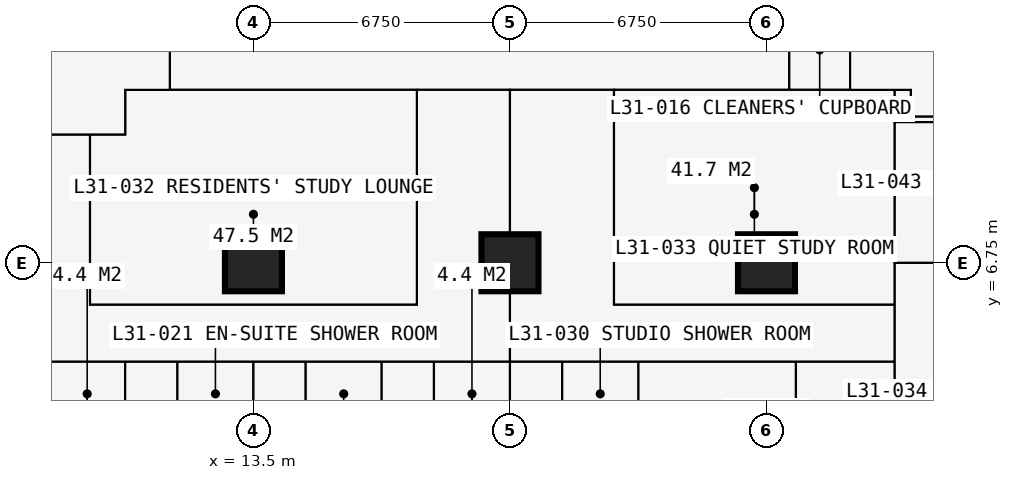
"""IFC4 building model, lengths in metres.
Left out: names, types, materials, properties, quantities, classifications, styles, units other than length and angle.
Written with IfcOpenShell. Run it as: python <this file> out.ifc"""

import sys

from ifc_helpers import new_model, si_unit, direction, frame, frame_2d, origin, origin_2d, place, context, subcontext, project, spatial, rectangle, extrude, element, fill, save


model = new_model("IFC4")
c1 = context("Model", 3, precision=1e-05, world=origin(), true_north=direction((0.0, 1.0)))
c2 = subcontext(c1, "Body", "Model", "MODEL_VIEW")
j1 = project(units=[si_unit("LENGTHUNIT", "METRE"), si_unit("PLANEANGLEUNIT", "RADIAN")], contexts=[c1])
p1 = place(None, origin())
s1 = spatial("IfcSite", under=j1, at=p1, CompositionType="ELEMENT")
p2 = place(p1, origin())
s2 = spatial("IfcBuilding", under=s1, at=p2, CompositionType="ELEMENT")
p3 = place(p2, frame((0.0, 0.0, 116.1)))
s3 = spatial("IfcBuildingStorey", under=s2, at=p3, CompositionType="ELEMENT", Elevation=116.1)
for number, where, z_axis, x_axis in (
    (1, (13.5, 6.75, 0.0), (0.0, 0.0, 1.0), (1.0, 0.0, 0.0)),
    (2, (20.25, 6.75, 0.0), (0.0, 0.0, 1.0), (1.0, 0.0, 0.0)),
    (3, (27.0, 6.75, 0.0), (0.0, 0.0, 1.0), (1.0, 0.0, 0.0)),
):
    element("IfcColumn", number, at=place(p3, frame(where, z_axis=z_axis, x_axis=x_axis)), inside=s3, PredefinedType="COLUMN", context=c2, shape_type="SweptSolid", body=[
        extrude(rectangle(XDim=1.5, YDim=1.5, at=origin_2d()), origin(), (0.0, 0.0, 1.0), 3.6),
    ])
p4 = place(p3, frame((-0.734, 10.125, 0.0), z_axis=(0.0, 0.0, 1.0), x_axis=(1.0, 0.0, 0.0)))
e4 = element("IfcWall", 4, at=p4, inside=s3, PredefinedType="PARTITIONING", context=c2, shape_type="SweptSolid", body=[
    extrude(rectangle(XDim=10.859, YDim=0.15, at=frame_2d((5.429, 0.0))), origin(), (0.0, 0.0, 1.0), 3.375),
])
p5 = place(p4, frame((5.134, 0.0, 0.0)))
e5 = element("IfcOpeningElement", 5, at=p5, cuts=e4, PredefinedType="OPENING", context=c2, shape_type="SweptSolid", body=[
    extrude(rectangle(XDim=1.0, YDim=2.2, at=frame_2d((0.5, 1.1))), frame((0.0, 0.085, 0.0), z_axis=(0.0, -1.0, 0.0), x_axis=(1.0, 0.0, 0.0)), (0.0, 0.0, 1.0), 0.17),
])
p6 = place(p3, frame((6.75, 4.15, 0.0), z_axis=(0.0, 0.0, 1.0), x_axis=(1.0, 0.0, 0.0)))
e6 = element("IfcWall", 6, at=p6, inside=s3, PredefinedType="PARTITIONING", context=c2, shape_type="SweptSolid", body=[
    extrude(rectangle(XDim=23.625, YDim=0.1, at=frame_2d((11.812, 0.0))), origin(), (0.0, 0.0, 1.0), 3.375),
])
p7 = place(p6, frame((0.2, 0.0, 0.0)))
e7 = element("IfcOpeningElement", 7, at=p7, cuts=e6, PredefinedType="OPENING", context=c2, shape_type="SweptSolid", body=[
    extrude(rectangle(XDim=0.95, YDim=2.2, at=frame_2d((0.475, 1.1))), frame((0.0, 0.06, 0.0), z_axis=(0.0, -1.0, 0.0), x_axis=(1.0, 0.0, 0.0)), (0.0, 0.0, 1.0), 0.12),
])
p8 = place(p6, frame((3.625, 0.0, 0.0)))
e8 = element("IfcOpeningElement", 8, at=p8, cuts=e6, PredefinedType="OPENING", context=c2, shape_type="SweptSolid", body=[
    extrude(rectangle(XDim=0.95, YDim=2.2, at=frame_2d((0.475, 1.1))), frame((0.0, 0.06, 0.0), z_axis=(0.0, -1.0, 0.0), x_axis=(1.0, 0.0, 0.0)), (0.0, 0.0, 1.0), 0.12),
])
p9 = place(p6, frame((7.0, 0.0, 0.0)))
e9 = element("IfcOpeningElement", 9, at=p9, cuts=e6, PredefinedType="OPENING", context=c2, shape_type="SweptSolid", body=[
    extrude(rectangle(XDim=0.95, YDim=2.2, at=frame_2d((0.475, 1.1))), frame((0.0, 0.06, 0.0), z_axis=(0.0, -1.0, 0.0), x_axis=(1.0, 0.0, 0.0)), (0.0, 0.0, 1.0), 0.12),
])
p10 = place(p6, frame((10.375, 0.0, 0.0)))
e10 = element("IfcOpeningElement", 10, at=p10, cuts=e6, PredefinedType="OPENING", context=c2, shape_type="SweptSolid", body=[
    extrude(rectangle(XDim=0.95, YDim=2.2, at=frame_2d((0.475, 1.1))), frame((0.0, 0.06, 0.0), z_axis=(0.0, -1.0, 0.0), x_axis=(1.0, 0.0, 0.0)), (0.0, 0.0, 1.0), 0.12),
])
p11 = place(p6, frame((18.475, 0.0, 0.0)))
e11 = element("IfcOpeningElement", 11, at=p11, cuts=e6, PredefinedType="OPENING", context=c2, shape_type="SweptSolid", body=[
    extrude(rectangle(XDim=0.95, YDim=2.2, at=frame_2d((0.475, 1.1))), frame((0.0, 0.06, 0.0), z_axis=(0.0, -1.0, 0.0), x_axis=(1.0, 0.0, 0.0)), (0.0, 0.0, 1.0), 0.12),
])
p12 = place(p6, frame((13.7, 0.0, 0.0)))
e12 = element("IfcOpeningElement", 12, at=p12, cuts=e6, PredefinedType="OPENING", context=c2, shape_type="SweptSolid", body=[
    extrude(rectangle(XDim=0.95, YDim=2.2, at=frame_2d((0.475, 1.1))), frame((0.0, 0.06, 0.0), z_axis=(0.0, -1.0, 0.0), x_axis=(1.0, 0.0, 0.0)), (0.0, 0.0, 1.0), 0.12),
])
p13 = place(p3, frame((9.2, 5.65, 0.0), z_axis=(0.0, 0.0, 1.0), x_axis=(0.0, 1.0, 0.0)))
e13 = element("IfcWall", 13, at=p13, inside=s3, PredefinedType="PARTITIONING", context=c2, shape_type="SweptSolid", body=[
    extrude(rectangle(XDim=4.475, YDim=0.15, at=frame_2d((2.238, 0.0))), origin(), (0.0, 0.0, 1.0), 3.375),
])
p14 = place(p3, frame((9.2, 5.65, 0.0), z_axis=(0.0, 0.0, 1.0), x_axis=(1.0, 0.0, 0.0)))
e14 = element("IfcWall", 14, at=p14, inside=s3, PredefinedType="PARTITIONING", context=c2, shape_type="SweptSolid", body=[
    extrude(rectangle(XDim=8.6, YDim=0.15, at=frame_2d((4.3, 0.0))), origin(), (0.0, 0.0, 1.0), 3.375),
])
p15 = place(p3, frame((10.125, -0.734, 0.0), z_axis=(0.0, 0.0, 1.0), x_axis=(0.0, 1.0, 0.0)))
e15 = element("IfcWall", 15, at=p15, inside=s3, PredefinedType="PARTITIONING", context=c2, shape_type="SweptSolid", body=[
    extrude(rectangle(XDim=4.884, YDim=0.175, at=frame_2d((2.442, 0.0))), origin(), (0.0, 0.0, 1.0), 3.375),
])
p16 = place(p3, frame((10.125, 10.125, 0.0), z_axis=(0.0, 0.0, 1.0), x_axis=(0.0, 1.0, 0.0)))
e16 = element("IfcWall", 16, at=p16, inside=s3, PredefinedType="PARTITIONING", context=c2, shape_type="SweptSolid", body=[
    extrude(rectangle(XDim=1.175, YDim=0.15, at=frame_2d((0.587, 0.0))), origin(), (0.0, 0.0, 1.0), 3.375),
])
p17 = place(p3, frame((10.125, 11.3, 0.0), z_axis=(0.0, 0.0, 1.0), x_axis=(1.0, 0.0, 0.0)))
e17 = element("IfcWall", 17, at=p17, inside=s3, PredefinedType="PARTITIONING", context=c2, shape_type="SweptSolid", body=[
    extrude(rectangle(XDim=20.675, YDim=0.15, at=frame_2d((10.337, 0.0))), origin(), (0.0, 0.0, 1.0), 3.375),
])
p18 = place(p17, frame((8.375, 0.0, 0.0)))
e18 = element("IfcOpeningElement", 18, at=p18, cuts=e17, PredefinedType="OPENING", context=c2, shape_type="SweptSolid", body=[
    extrude(rectangle(XDim=1.0, YDim=2.2, at=frame_2d((0.5, 1.1))), frame((0.0, 0.085, 0.0), z_axis=(0.0, -1.0, 0.0), x_axis=(1.0, 0.0, 0.0)), (0.0, 0.0, 1.0), 0.17),
])
p19 = place(p17, frame((10.975, 0.0, 0.0)))
e19 = element("IfcOpeningElement", 19, at=p19, cuts=e17, PredefinedType="OPENING", context=c2, shape_type="SweptSolid", body=[
    extrude(rectangle(XDim=1.0, YDim=2.2, at=frame_2d((0.5, 1.1))), frame((0.0, 0.085, 0.0), z_axis=(0.0, -1.0, 0.0), x_axis=(1.0, 0.0, 0.0)), (0.0, 0.0, 1.0), 0.17),
])
p20 = place(p17, frame((3.925, 0.0, 0.0)))
e20 = element("IfcOpeningElement", 20, at=p20, cuts=e17, PredefinedType="OPENING", context=c2, shape_type="SweptSolid", body=[
    extrude(rectangle(XDim=0.95, YDim=2.2, at=frame_2d((0.475, 1.1))), frame((0.0, 0.085, 0.0), z_axis=(0.0, -1.0, 0.0), x_axis=(1.0, 0.0, 0.0)), (0.0, 0.0, 1.0), 0.17),
])
p21 = place(p3, frame((11.3, 11.3, 0.0), z_axis=(0.0, 0.0, 1.0), x_axis=(0.0, 1.0, 0.0)))
e21 = element("IfcWall", 21, at=p21, inside=s3, PredefinedType="PARTITIONING", context=c2, shape_type="SweptSolid", body=[
    extrude(rectangle(XDim=19.3, YDim=0.15, at=frame_2d((9.65, 0.0))), origin(), (0.0, 0.0, 1.0), 3.375),
])
p22 = place(p21, frame((13.525, 0.0, 0.0)))
e22 = element("IfcOpeningElement", 22, at=p22, cuts=e21, PredefinedType="OPENING", context=c2, shape_type="SweptSolid", body=[
    extrude(rectangle(XDim=1.0, YDim=2.2, at=frame_2d((0.5, 1.1))), frame((0.0, 0.085, 0.0), z_axis=(0.0, -1.0, 0.0), x_axis=(1.0, 0.0, 0.0)), (0.0, 0.0, 1.0), 0.17),
])
p23 = place(p21, frame((10.438, 0.0, 0.0)))
e23 = element("IfcOpeningElement", 23, at=p23, cuts=e21, PredefinedType="OPENING", context=c2, shape_type="SweptSolid", body=[
    extrude(rectangle(XDim=1.0, YDim=2.2, at=frame_2d((0.5, 1.1))), frame((0.0, 0.085, 0.0), z_axis=(0.0, -1.0, 0.0), x_axis=(1.0, 0.0, 0.0)), (0.0, 0.0, 1.0), 0.17),
])
p24 = place(p3, frame((11.5, 1.95, 0.0), z_axis=(0.0, 0.0, 1.0), x_axis=(0.0, 1.0, 0.0)))
e24 = element("IfcWall", 24, at=p24, inside=s3, PredefinedType="PARTITIONING", context=c2, shape_type="SweptSolid", body=[
    extrude(rectangle(XDim=2.2, YDim=0.1, at=frame_2d((1.1, 0.0))), origin(), (0.0, 0.0, 1.0), 3.375),
])
p25 = place(p24, frame((0.65, 0.0, 0.0)))
e25 = element("IfcOpeningElement", 25, at=p25, cuts=e24, PredefinedType="OPENING", context=c2, shape_type="SweptSolid", body=[
    extrude(rectangle(XDim=0.9, YDim=2.2, at=frame_2d((0.45, 1.1))), frame((0.0, 0.06, 0.0), z_axis=(0.0, -1.0, 0.0), x_axis=(1.0, 0.0, 0.0)), (0.0, 0.0, 1.0), 0.12),
])
p26 = place(p3, frame((13.5, -0.734, 0.0), z_axis=(0.0, 0.0, 1.0), x_axis=(0.0, 1.0, 0.0)))
e26 = element("IfcWall", 26, at=p26, inside=s3, PredefinedType="PARTITIONING", context=c2, shape_type="SweptSolid", body=[
    extrude(rectangle(XDim=4.884, YDim=0.175, at=frame_2d((2.442, 0.0))), origin(), (0.0, 0.0, 1.0), 2.877),
])
p27 = place(p3, frame((14.875, 1.95, 0.0), z_axis=(0.0, 0.0, 1.0), x_axis=(0.0, 1.0, 0.0)))
e27 = element("IfcWall", 27, at=p27, inside=s3, PredefinedType="PARTITIONING", context=c2, shape_type="SweptSolid", body=[
    extrude(rectangle(XDim=2.2, YDim=0.1, at=frame_2d((1.1, 0.0))), origin(), (0.0, 0.0, 1.0), 3.375),
])
p28 = place(p27, frame((0.65, 0.0, 0.0)))
e28 = element("IfcOpeningElement", 28, at=p28, cuts=e27, PredefinedType="OPENING", context=c2, shape_type="SweptSolid", body=[
    extrude(rectangle(XDim=0.9, YDim=2.2, at=frame_2d((0.45, 1.1))), frame((0.0, 0.06, 0.0), z_axis=(0.0, -1.0, 0.0), x_axis=(1.0, 0.0, 0.0)), (0.0, 0.0, 1.0), 0.12),
])
p29 = place(p3, frame((16.875, -0.734, 0.0), z_axis=(0.0, 0.0, 1.0), x_axis=(0.0, 1.0, 0.0)))
e29 = element("IfcWall", 29, at=p29, inside=s3, PredefinedType="PARTITIONING", context=c2, shape_type="SweptSolid", body=[
    extrude(rectangle(XDim=4.884, YDim=0.175, at=frame_2d((2.442, 0.0))), origin(), (0.0, 0.0, 1.0), 3.375),
])
p30 = place(p3, frame((17.8, 5.65, 0.0), z_axis=(0.0, 0.0, 1.0), x_axis=(0.0, 1.0, 0.0)))
e30 = element("IfcWall", 30, at=p30, inside=s3, PredefinedType="PARTITIONING", context=c2, shape_type="SweptSolid", body=[
    extrude(rectangle(XDim=5.65, YDim=0.15, at=frame_2d((2.825, 0.0))), origin(), (0.0, 0.0, 1.0), 3.375),
])
p31 = place(p3, frame((18.25, 1.95, 0.0), z_axis=(0.0, 0.0, 1.0), x_axis=(0.0, 1.0, 0.0)))
e31 = element("IfcWall", 31, at=p31, inside=s3, PredefinedType="PARTITIONING", context=c2, shape_type="SweptSolid", body=[
    extrude(rectangle(XDim=2.2, YDim=0.1, at=frame_2d((1.1, 0.0))), origin(), (0.0, 0.0, 1.0), 3.375),
])
p32 = place(p31, frame((0.65, 0.0, 0.0)))
e32 = element("IfcOpeningElement", 32, at=p32, cuts=e31, PredefinedType="OPENING", context=c2, shape_type="SweptSolid", body=[
    extrude(rectangle(XDim=0.9, YDim=2.2, at=frame_2d((0.45, 1.1))), frame((0.0, 0.06, 0.0), z_axis=(0.0, -1.0, 0.0), x_axis=(1.0, 0.0, 0.0)), (0.0, 0.0, 1.0), 0.12),
])
p33 = place(p3, frame((20.25, -0.734, 0.0), z_axis=(0.0, 0.0, 1.0), x_axis=(0.0, 1.0, 0.0)))
e33 = element("IfcWall", 33, at=p33, inside=s3, PredefinedType="PARTITIONING", context=c2, shape_type="SweptSolid", body=[
    extrude(rectangle(XDim=12.034, YDim=0.15, at=frame_2d((6.017, 0.0))), origin(), (0.0, 0.0, 1.0), 2.61),
])
p34 = place(p3, frame((21.625, 1.95, 0.0), z_axis=(0.0, 0.0, 1.0), x_axis=(0.0, 1.0, 0.0)))
e34 = element("IfcWall", 34, at=p34, inside=s3, PredefinedType="PARTITIONING", context=c2, shape_type="SweptSolid", body=[
    extrude(rectangle(XDim=2.2, YDim=0.1, at=frame_2d((1.1, 0.0))), origin(), (0.0, 0.0, 1.0), 3.375),
])
p35 = place(p3, frame((22.988, 5.65, 0.0), z_axis=(0.0, 0.0, 1.0), x_axis=(1.0, 0.0, 0.0)))
e35 = element("IfcWall", 35, at=p35, inside=s3, PredefinedType="PARTITIONING", context=c2, shape_type="SweptSolid", body=[
    extrude(rectangle(XDim=7.387, YDim=0.15, at=frame_2d((3.694, 0.0))), origin(), (0.0, 0.0, 1.0), 3.375),
])
p36 = place(p35, frame((2.3, 0.0, 0.0)))
e36 = element("IfcOpeningElement", 36, at=p36, cuts=e35, PredefinedType="OPENING", context=c2, shape_type="SweptSolid", body=[
    extrude(rectangle(XDim=0.95, YDim=2.2, at=frame_2d((0.475, 1.1))), frame((0.0, 0.085, 0.0), z_axis=(0.0, -1.0, 0.0), x_axis=(1.0, 0.0, 0.0)), (0.0, 0.0, 1.0), 0.17),
])
p37 = place(p3, frame((22.988, 5.65, 0.0), z_axis=(0.0, 0.0, 1.0), x_axis=(0.0, 1.0, 0.0)))
e37 = element("IfcWall", 37, at=p37, inside=s3, PredefinedType="PARTITIONING", context=c2, shape_type="SweptSolid", body=[
    extrude(rectangle(XDim=5.65, YDim=0.15, at=frame_2d((2.825, 0.0))), origin(), (0.0, 0.0, 1.0), 3.375),
])
p38 = place(p3, frame((23.625, -0.734, 0.0), z_axis=(0.0, 0.0, 1.0), x_axis=(0.0, 1.0, 0.0)))
e38 = element("IfcWall", 38, at=p38, inside=s3, PredefinedType="PARTITIONING", context=c2, shape_type="SweptSolid", body=[
    extrude(rectangle(XDim=4.884, YDim=0.175, at=frame_2d((2.442, 0.0))), origin(), (0.0, 0.0, 1.0), 3.375),
])
p39 = place(p38, frame((3.334, 0.0, 0.0)))
e39 = element("IfcOpeningElement", 39, at=p39, cuts=e38, PredefinedType="OPENING", context=c2, shape_type="SweptSolid", body=[
    extrude(rectangle(XDim=0.9, YDim=2.2, at=frame_2d((0.45, 1.1))), frame((0.0, 0.097, 0.0), z_axis=(0.0, -1.0, 0.0), x_axis=(1.0, 0.0, 0.0)), (0.0, 0.0, 1.0), 0.195),
])
p40 = place(p3, frame((27.6, 11.3, 0.0), z_axis=(0.0, 0.0, 1.0), x_axis=(0.0, 1.0, 0.0)))
e40 = element("IfcWall", 40, at=p40, inside=s3, PredefinedType="PARTITIONING", context=c2, shape_type="SweptSolid", body=[
    extrude(rectangle(XDim=1.6, YDim=0.15, at=frame_2d((0.8, 0.0))), origin(), (0.0, 0.0, 1.0), 3.375),
])
p41 = place(p40, frame((0.3, 0.0, 0.0)))
e41 = element("IfcOpeningElement", 41, at=p41, cuts=e40, PredefinedType="OPENING", context=c2, shape_type="SweptSolid", body=[
    extrude(rectangle(XDim=0.95, YDim=2.2, at=frame_2d((0.475, 1.1))), frame((0.0, 0.085, 0.0), z_axis=(0.0, -1.0, 0.0), x_axis=(1.0, 0.0, 0.0)), (0.0, 0.0, 1.0), 0.17),
])
p42 = place(p3, frame((27.775, 1.75, 0.0), z_axis=(0.0, 0.0, 1.0), x_axis=(0.0, 1.0, 0.0)))
e42 = element("IfcWall", 42, at=p42, inside=s3, PredefinedType="PARTITIONING", context=c2, shape_type="SweptSolid", body=[
    extrude(rectangle(XDim=2.4, YDim=0.1, at=frame_2d((1.2, 0.0))), origin(), (0.0, 0.0, 1.0), 3.375),
])
p43 = place(p3, frame((29.2, 11.3, 0.0), z_axis=(0.0, 0.0, 1.0), x_axis=(0.0, 1.0, 0.0)))
e43 = element("IfcWall", 43, at=p43, inside=s3, PredefinedType="PARTITIONING", context=c2, shape_type="SweptSolid", body=[
    extrude(rectangle(XDim=17.9, YDim=0.2, at=frame_2d((8.95, 0.0))), origin(), (0.0, 0.0, 1.0), 3.375),
])
p44 = place(p43, frame((8.35, 0.0, 0.0)))
e44 = element("IfcOpeningElement", 44, at=p44, cuts=e43, PredefinedType="OPENING", context=c2, shape_type="SweptSolid", body=[
    extrude(rectangle(XDim=1.2, YDim=2.2, at=frame_2d((0.6, 1.1))), frame((0.0, 0.11, 0.0), z_axis=(0.0, -1.0, 0.0), x_axis=(1.0, 0.0, 0.0)), (0.0, 0.0, 1.0), 0.22),
])
p45 = place(p3, frame((30.375, -0.734, 0.0), z_axis=(0.0, 0.0, 1.0), x_axis=(0.0, 1.0, 0.0)))
e45 = element("IfcWall", 45, at=p45, inside=s3, PredefinedType="PARTITIONING", context=c2, shape_type="SweptSolid", body=[
    extrude(rectangle(XDim=12.034, YDim=0.15, at=frame_2d((6.017, 0.0))), origin(), (0.0, 0.0, 1.0), 3.375),
])
p46 = place(p45, frame((5.134, 0.0, 0.0)))
e46 = element("IfcOpeningElement", 46, at=p46, cuts=e45, PredefinedType="OPENING", context=c2, shape_type="SweptSolid", body=[
    extrude(rectangle(XDim=1.0, YDim=2.2, at=frame_2d((0.5, 1.1))), frame((0.0, 0.085, 0.0), z_axis=(0.0, -1.0, 0.0), x_axis=(1.0, 0.0, 0.0)), (0.0, 0.0, 1.0), 0.17),
])
p47 = place(p3, frame((30.375, 6.75, 0.0), z_axis=(0.0, 0.0, 1.0), x_axis=(1.0, 0.0, 0.0)))
e47 = element("IfcWall", 47, at=p47, inside=s3, PredefinedType="PARTITIONING", context=c2, shape_type="SweptSolid", body=[
    extrude(rectangle(XDim=5.975, YDim=0.15, at=frame_2d((2.988, 0.0))), origin(), (0.0, 0.0, 1.0), 2.877),
])
p48 = place(p3, frame((30.375, 10.45, 0.0), z_axis=(0.0, 0.0, 1.0), x_axis=(1.0, 0.0, 0.0)))
e48 = element("IfcWall", 48, at=p48, inside=s3, PredefinedType="PARTITIONING", context=c2, shape_type="SweptSolid", body=[
    extrude(rectangle(XDim=4.475, YDim=0.15, at=frame_2d((2.238, 0.0))), origin(), (0.0, 0.0, 1.0), 3.375),
])
p49 = place(p48, frame((2.35, 0.0, 0.0)))
e49 = element("IfcOpeningElement", 49, at=p49, cuts=e48, PredefinedType="OPENING", context=c2, shape_type="SweptSolid", body=[
    extrude(rectangle(XDim=0.95, YDim=2.2, at=frame_2d((0.475, 1.1))), frame((0.0, 0.085, 0.0), z_axis=(0.0, -1.0, 0.0), x_axis=(1.0, 0.0, 0.0)), (0.0, 0.0, 1.0), 0.17),
])
p50 = place(p3, frame((30.8, 10.6, 0.0), z_axis=(0.0, 0.0, 1.0), x_axis=(0.0, 1.0, 0.0)))
e50 = element("IfcWall", 50, at=p50, inside=s3, PredefinedType="PARTITIONING", context=c2, shape_type="SweptSolid", body=[
    extrude(rectangle(XDim=0.7, YDim=0.15, at=frame_2d((0.35, 0.0))), origin(), (0.0, 0.0, 1.0), 3.375),
])
p51 = place(p3, frame((30.8, 10.6, 0.0), z_axis=(0.0, 0.0, 1.0), x_axis=(1.0, 0.0, 0.0)))
e51 = element("IfcWall", 51, at=p51, inside=s3, PredefinedType="PARTITIONING", context=c2, shape_type="SweptSolid", body=[
    extrude(rectangle(XDim=1.85, YDim=0.15, at=frame_2d((0.925, 0.0))), origin(), (0.0, 0.0, 1.0), 3.375),
])
p52 = place(p41, origin())
e52 = element("IfcDoor", 52, at=p52, inside=s3, OperationType="SINGLE_SWING_LEFT", PredefinedType="DOOR", context=c2, shape_type="SweptSolid", body=[
    extrude(rectangle(XDim=0.95, YDim=2.2, at=frame_2d((0.475, 1.1))), frame((0.0, 0.025, 0.0), z_axis=(0.0, -1.0, 0.0), x_axis=(1.0, 0.0, 0.0)), (0.0, 0.0, 1.0), 0.05),
])
fill(e41, e52)
p53 = place(p8, origin())
e53 = element("IfcDoor", 53, at=p53, inside=s3, OperationType="SINGLE_SWING_LEFT", PredefinedType="DOOR", context=c2, shape_type="SweptSolid", body=[
    extrude(rectangle(XDim=0.95, YDim=2.2, at=frame_2d((0.475, 1.1))), frame((0.0, 0.025, 0.0), z_axis=(0.0, -1.0, 0.0), x_axis=(1.0, 0.0, 0.0)), (0.0, 0.0, 1.0), 0.05),
])
fill(e8, e53)
p54 = place(p25, origin())
e54 = element("IfcDoor", 54, at=p54, inside=s3, OperationType="SINGLE_SWING_RIGHT", PredefinedType="DOOR", context=c2, shape_type="SweptSolid", body=[
    extrude(rectangle(XDim=0.9, YDim=2.2, at=frame_2d((0.45, 1.1))), frame((0.0, 0.025, 0.0), z_axis=(0.0, -1.0, 0.0), x_axis=(1.0, 0.0, 0.0)), (0.0, 0.0, 1.0), 0.05),
])
fill(e25, e54)
p55 = place(p9, origin())
e55 = element("IfcDoor", 55, at=p55, inside=s3, OperationType="SINGLE_SWING_LEFT", PredefinedType="DOOR", context=c2, shape_type="SweptSolid", body=[
    extrude(rectangle(XDim=0.95, YDim=2.2, at=frame_2d((0.475, 1.1))), frame((0.0, 0.025, 0.0), z_axis=(0.0, -1.0, 0.0), x_axis=(1.0, 0.0, 0.0)), (0.0, 0.0, 1.0), 0.05),
])
fill(e9, e55)
p56 = place(p28, origin())
e56 = element("IfcDoor", 56, at=p56, inside=s3, OperationType="SINGLE_SWING_RIGHT", PredefinedType="DOOR", context=c2, shape_type="SweptSolid", body=[
    extrude(rectangle(XDim=0.9, YDim=2.2, at=frame_2d((0.45, 1.1))), frame((0.0, 0.025, 0.0), z_axis=(0.0, -1.0, 0.0), x_axis=(1.0, 0.0, 0.0)), (0.0, 0.0, 1.0), 0.05),
])
fill(e28, e56)
p57 = place(p10, origin())
e57 = element("IfcDoor", 57, at=p57, inside=s3, OperationType="SINGLE_SWING_LEFT", PredefinedType="DOOR", context=c2, shape_type="SweptSolid", body=[
    extrude(rectangle(XDim=0.95, YDim=2.2, at=frame_2d((0.475, 1.1))), frame((0.0, 0.025, 0.0), z_axis=(0.0, -1.0, 0.0), x_axis=(1.0, 0.0, 0.0)), (0.0, 0.0, 1.0), 0.05),
])
fill(e10, e57)
p58 = place(p32, origin())
e58 = element("IfcDoor", 58, at=p58, inside=s3, OperationType="SINGLE_SWING_RIGHT", PredefinedType="DOOR", context=c2, shape_type="SweptSolid", body=[
    extrude(rectangle(XDim=0.9, YDim=2.2, at=frame_2d((0.45, 1.1))), frame((0.0, 0.025, 0.0), z_axis=(0.0, -1.0, 0.0), x_axis=(1.0, 0.0, 0.0)), (0.0, 0.0, 1.0), 0.05),
])
fill(e32, e58)
p59 = place(p18, origin())
e59 = element("IfcDoor", 59, at=p59, inside=s3, OperationType="SINGLE_SWING_LEFT", PredefinedType="DOOR", context=c2, shape_type="SweptSolid", body=[
    extrude(rectangle(XDim=1.0, YDim=2.2, at=frame_2d((0.5, 1.1))), frame((0.0, 0.025, 0.0), z_axis=(0.0, -1.0, 0.0), x_axis=(1.0, 0.0, 0.0)), (0.0, 0.0, 1.0), 0.05),
])
fill(e18, e59)
p60 = place(p11, origin())
e60 = element("IfcDoor", 60, at=p60, inside=s3, OperationType="SINGLE_SWING_LEFT", PredefinedType="DOOR", context=c2, shape_type="SweptSolid", body=[
    extrude(rectangle(XDim=0.95, YDim=2.2, at=frame_2d((0.475, 1.1))), frame((0.0, 0.025, 0.0), z_axis=(0.0, -1.0, 0.0), x_axis=(1.0, 0.0, 0.0)), (0.0, 0.0, 1.0), 0.05),
])
fill(e11, e60)
p61 = place(p12, origin())
e61 = element("IfcDoor", 61, at=p61, inside=s3, OperationType="SINGLE_SWING_LEFT", PredefinedType="DOOR", context=c2, shape_type="SweptSolid", body=[
    extrude(rectangle(XDim=0.95, YDim=2.2, at=frame_2d((0.475, 1.1))), frame((0.0, 0.025, 0.0), z_axis=(0.0, -1.0, 0.0), x_axis=(1.0, 0.0, 0.0)), (0.0, 0.0, 1.0), 0.05),
])
fill(e12, e61)
p62 = place(p39, origin())
e62 = element("IfcDoor", 62, at=p62, inside=s3, OperationType="SINGLE_SWING_RIGHT", PredefinedType="DOOR", context=c2, shape_type="SweptSolid", body=[
    extrude(rectangle(XDim=0.9, YDim=2.2, at=frame_2d((0.45, 1.1))), frame((0.0, 0.025, 0.0), z_axis=(0.0, -1.0, 0.0), x_axis=(1.0, 0.0, 0.0)), (0.0, 0.0, 1.0), 0.05),
])
fill(e39, e62)
p63 = place(p19, origin())
e63 = element("IfcDoor", 63, at=p63, inside=s3, OperationType="SINGLE_SWING_LEFT", PredefinedType="DOOR", context=c2, shape_type="SweptSolid", body=[
    extrude(rectangle(XDim=1.0, YDim=2.2, at=frame_2d((0.5, 1.1))), frame((0.0, 0.025, 0.0), z_axis=(0.0, -1.0, 0.0), x_axis=(1.0, 0.0, 0.0)), (0.0, 0.0, 1.0), 0.05),
])
fill(e19, e63)
p64 = place(p20, origin())
e64 = element("IfcDoor", 64, at=p64, inside=s3, OperationType="SINGLE_SWING_LEFT", PredefinedType="DOOR", context=c2, shape_type="SweptSolid", body=[
    extrude(rectangle(XDim=0.95, YDim=2.2, at=frame_2d((0.475, 1.1))), frame((0.0, 0.025, 0.0), z_axis=(0.0, -1.0, 0.0), x_axis=(1.0, 0.0, 0.0)), (0.0, 0.0, 1.0), 0.05),
])
fill(e20, e64)
p65 = place(p36, origin())
e65 = element("IfcDoor", 65, at=p65, inside=s3, OperationType="SINGLE_SWING_LEFT", PredefinedType="DOOR", context=c2, shape_type="SweptSolid", body=[
    extrude(rectangle(XDim=0.95, YDim=2.2, at=frame_2d((0.475, 1.1))), frame((0.0, 0.025, 0.0), z_axis=(0.0, -1.0, 0.0), x_axis=(1.0, 0.0, 0.0)), (0.0, 0.0, 1.0), 0.05),
])
fill(e36, e65)
p66 = place(p46, origin())
e66 = element("IfcDoor", 66, at=p66, inside=s3, OperationType="SINGLE_SWING_LEFT", PredefinedType="DOOR", context=c2, shape_type="SweptSolid", body=[
    extrude(rectangle(XDim=1.0, YDim=2.2, at=frame_2d((0.5, 1.1))), frame((0.0, 0.025, 0.0), z_axis=(0.0, -1.0, 0.0), x_axis=(1.0, 0.0, 0.0)), (0.0, 0.0, 1.0), 0.05),
])
fill(e46, e66)
save(model, sys.argv[1])
